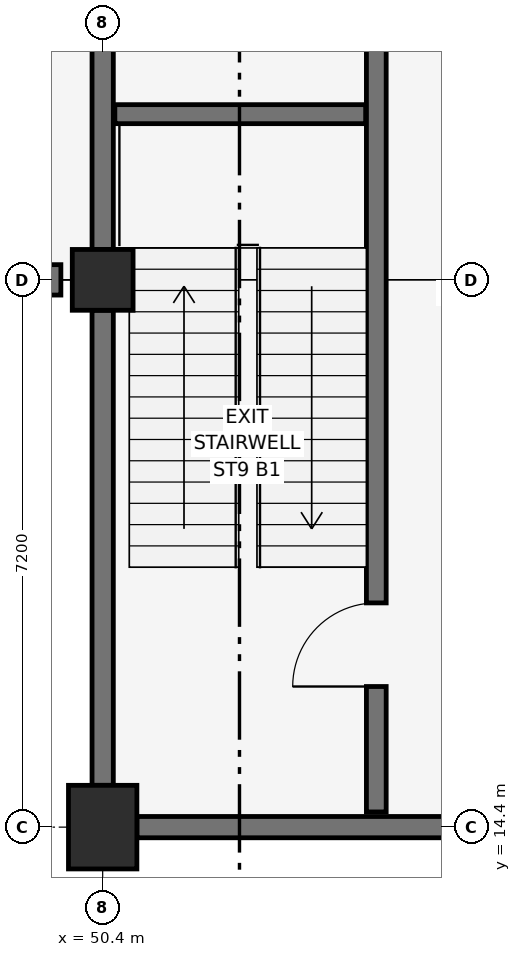
"""IFC4 building model, lengths in metres.
Left out: names, types, materials, properties, quantities, classifications, styles, units other than length and angle.
Written with IfcOpenShell. Run it as: python <this file> out.ifc"""

import sys

from ifc_helpers import new_model, si_unit, direction, frame, frame_2d, origin, origin_2d, place, context, subcontext, project, spatial, rectangle, extrude, element, fill, save


model = new_model("IFC4")
c1 = context("Model", 3, precision=1e-05, world=origin(), true_north=direction((0.0, 1.0)))
c2 = subcontext(c1, "Body", "Model", "MODEL_VIEW")
j1 = project(units=[si_unit("LENGTHUNIT", "METRE"), si_unit("PLANEANGLEUNIT", "RADIAN")], contexts=[c1])
p1 = place(None, origin())
s1 = spatial("IfcSite", under=j1, at=p1, CompositionType="ELEMENT")
p2 = place(p1, origin())
s2 = spatial("IfcBuilding", under=s1, at=p2, CompositionType="ELEMENT")
p3 = place(p2, frame((0.0, 0.0, -5.4)))
s3 = spatial("IfcBuildingStorey", under=s2, at=p3, CompositionType="ELEMENT", Elevation=-5.4)
p4 = place(p3, frame((50.4, 14.4, -0.45), z_axis=(0.0, 0.0, 1.0), x_axis=(1.0, 0.0, 0.0)))
e1 = element("IfcColumn", 1, at=p4, inside=s3, PredefinedType="COLUMN", context=c2, shape_type="SweptSolid", body=[
    extrude(rectangle(XDim=0.9, YDim=1.1, at=origin_2d()), origin(), (0.0, 0.0, 1.0), 5.85),
])
p5 = place(p3, frame((50.4, 21.6, -0.45), z_axis=(0.0, 0.0, 1.0), x_axis=(1.0, 0.0, 0.0)))
e2 = element("IfcColumn", 2, at=p5, inside=s3, PredefinedType="COLUMN", context=c2, shape_type="SweptSolid", body=[
    extrude(rectangle(XDim=0.8, YDim=0.8, at=origin_2d()), origin(), (0.0, 0.0, 1.0), 5.85),
])
p6 = place(p3, frame((43.75, 21.6, 0.0), z_axis=(0.0, 0.0, 1.0), x_axis=(1.0, 0.0, 0.0)))
e3 = element("IfcWall", 3, at=p6, inside=s3, PredefinedType="USERDEFINED", context=c2, shape_type="SweptSolid", body=[
    extrude(rectangle(XDim=6.1, YDim=0.4, at=frame_2d((3.05, 0.0))), origin(), (0.0, 0.0, 1.0), 5.12),
])
p7 = place(p3, frame((50.85, 14.4, 0.0), z_axis=(0.0, 0.0, 1.0), x_axis=(1.0, 0.0, 0.0)))
e4 = element("IfcWall", 4, at=p7, inside=s3, PredefinedType="SHEAR", context=c2, shape_type="SweptSolid", body=[
    extrude(rectangle(XDim=6.3, YDim=0.28, at=frame_2d((3.15, 0.0))), origin(), (0.0, 0.0, 1.0), 5.12),
])
p8 = place(p3, frame((50.4, 14.95, 0.0), z_axis=(0.0, 0.0, 1.0), x_axis=(0.0, 1.0, 0.0)))
e5 = element("IfcWall", 5, at=p8, inside=s3, PredefinedType="SHEAR", context=c2, shape_type="SweptSolid", body=[
    extrude(rectangle(XDim=6.25, YDim=0.28, at=frame_2d((3.125, 0.0))), origin(), (0.0, 0.0, 1.0), 5.12),
])
p9 = place(p3, frame((50.4, 22.0, 0.0), z_axis=(0.0, 0.0, 1.0), x_axis=(0.0, 1.0, 0.0)))
e6 = element("IfcWall", 6, at=p9, inside=s3, PredefinedType="SHEAR", context=c2, shape_type="SweptSolid", body=[
    extrude(rectangle(XDim=6.4, YDim=0.28, at=frame_2d((3.2, 0.0))), origin(), (0.0, 0.0, 1.0), 5.12),
])
p10 = place(p3, frame((54.0, 14.6, 0.0), z_axis=(0.0, 0.0, 1.0), x_axis=(0.0, 1.0, 0.0)))
e7 = element("IfcWall", 7, at=p10, inside=s3, PredefinedType="SHEAR", context=c2, shape_type="SweptSolid", body=[
    extrude(rectangle(XDim=14.0, YDim=0.26, at=frame_2d((7.0, 0.0))), origin(), (0.0, 0.0, 1.0), 5.12),
])
p11 = place(p10, frame((1.65, 0.0, 0.0)))
e8 = element("IfcOpeningElement", 8, at=p11, cuts=e7, PredefinedType="OPENING", context=c2, shape_type="SweptSolid", body=[
    extrude(rectangle(XDim=1.1, YDim=2.15, at=frame_2d((0.55, 1.075))), frame((0.0, 0.145, 0.0), z_axis=(0.0, -1.0, 0.0), x_axis=(1.0, 0.0, 0.0)), (0.0, 0.0, 1.0), 0.29),
])
p12 = place(p3, frame((50.56, 23.78, 0.0), z_axis=(0.0, 0.0, 1.0), x_axis=(1.0, 0.0, 0.0)))
e9 = element("IfcWall", 9, at=p12, inside=s3, PredefinedType="SHEAR", context=c2, shape_type="SweptSolid", body=[
    extrude(rectangle(XDim=3.3, YDim=0.25, at=frame_2d((1.65, 0.0))), origin(), (0.0, 0.0, 1.0), 5.12),
])
p13 = place(p11, origin())
e10 = element("IfcDoor", 10, at=p13, inside=s3, OperationType="SINGLE_SWING_LEFT", PredefinedType="DOOR", context=c2, shape_type="SweptSolid", body=[
    extrude(rectangle(XDim=1.1, YDim=2.15, at=frame_2d((0.55, 1.075))), frame((0.0, 0.025, 0.0), z_axis=(0.0, -1.0, 0.0), x_axis=(1.0, 0.0, 0.0)), (0.0, 0.0, 1.0), 0.05),
])
fill(e8, e10)
save(model, sys.argv[1])
